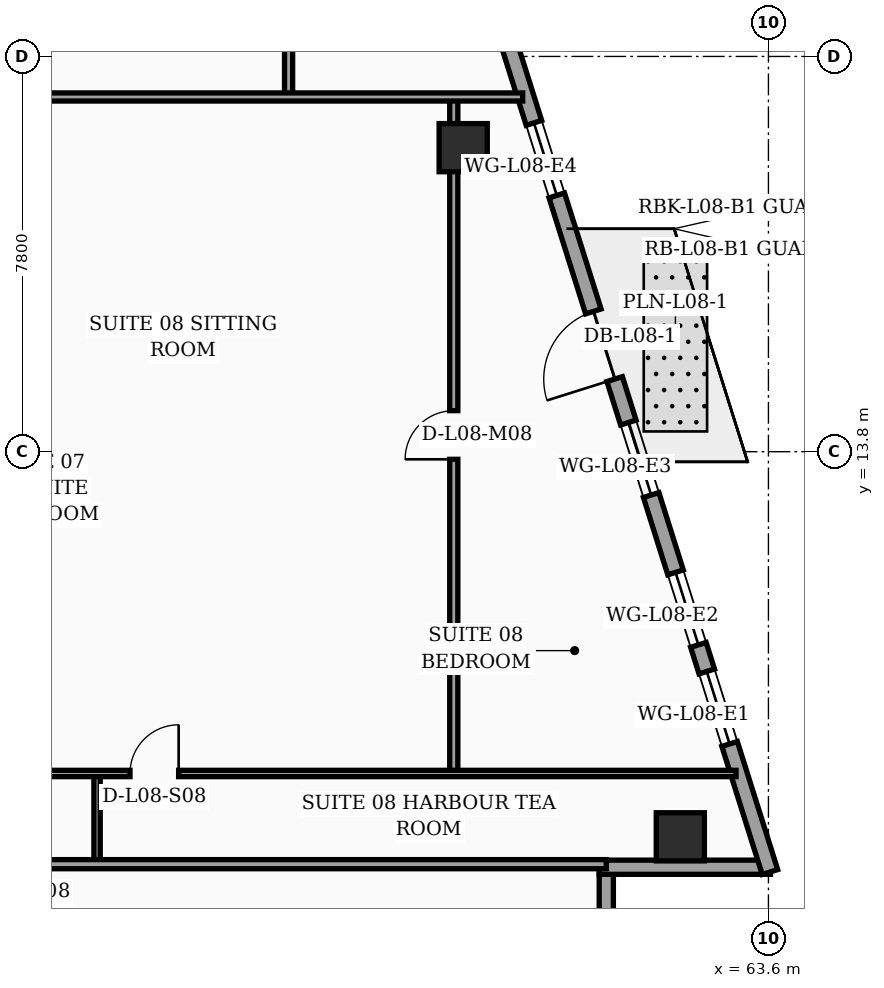
"""IFC4 building model, lengths in metres.
Left out: names, types, materials, properties, quantities, classifications, styles, units other than length and angle.
Written with IfcOpenShell. Run it as: python <this file> out.ifc"""

import sys

from ifc_helpers import new_model, si_unit, direction, frame, frame_2d, origin, origin_2d, place, context, subcontext, project, spatial, rectangle, hollow_rectangle, extrude, element, fill, save


model = new_model("IFC4")
c1 = context("Model", 3, precision=1e-05, world=origin(), true_north=direction((0.0, 1.0)))
c2 = subcontext(c1, "Body", "Model", "MODEL_VIEW")
j1 = project(units=[si_unit("LENGTHUNIT", "METRE"), si_unit("PLANEANGLEUNIT", "RADIAN")], contexts=[c1])
p1 = place(None, origin())
s1 = spatial("IfcSite", under=j1, at=p1, CompositionType="ELEMENT")
p2 = place(p1, origin())
s2 = spatial("IfcBuilding", under=s1, at=p2, CompositionType="ELEMENT")
p3 = place(p2, frame((0.0, 0.0, 38.4)))
s3 = spatial("IfcBuildingStorey", under=s2, at=p3, CompositionType="ELEMENT", Elevation=38.4)
for number, where, z_axis, x_axis in (
    (1, (61.861, 6.2, 0.0), (0.0, 0.0, 1.0), (1.0, 0.0, 0.0)),
    (2, (57.576, 19.8, 0.0), (0.0, 0.0, 1.0), (1.0, 0.0, 0.0)),
):
    element("IfcColumn", number, at=place(p3, frame(where, z_axis=z_axis, x_axis=x_axis)), inside=s3, PredefinedType="COLUMN", context=c2, shape_type="SweptSolid", body=[
        extrude(hollow_rectangle(XDim=0.95, YDim=0.95, WallThickness=0.04, at=origin_2d()), origin(), (0.0, 0.0, 1.0), 3.56),
    ])
p4 = place(p3, frame((60.4, 2.52, 0.0), z_axis=(0.0, 0.0, 1.0), x_axis=(0.0, 1.0, 0.0)))
e3 = element("IfcWall", 3, at=p4, inside=s3, PredefinedType="SOLIDWALL", context=c2, shape_type="SweptSolid", body=[
    extrude(rectangle(XDim=2.94, YDim=0.28, at=frame_2d((1.47, 0.0))), origin(), (0.0, 0.0, 1.0), 3.04),
])
p5 = place(p3, frame((60.26, 5.6, 0.0), z_axis=(0.0, 0.0, 1.0), x_axis=(1.0, 0.0, 0.0)))
e4 = element("IfcWall", 4, at=p5, inside=s3, PredefinedType="SOLIDWALL", context=c2, shape_type="SweptSolid", body=[
    extrude(rectangle(XDim=3.38, YDim=0.28, at=frame_2d((1.69, 0.0))), origin(), (0.0, 0.0, 1.0), 3.04),
])
p6 = place(p3, frame((63.63, 5.505, 0.0), z_axis=(0.0, 0.0, 1.0), x_axis=(-0.300501856448, 0.953781229775, 0.0)))
e5 = element("IfcWall", 5, at=p6, inside=s3, PredefinedType="SOLIDWALL", context=c2, shape_type="SweptSolid", body=[
    extrude(rectangle(XDim=30.814, YDim=0.32, at=frame_2d((15.407, 0.0))), origin(), (0.0, 0.0, 1.0), 3.56),
])
p7 = place(p6, frame((10.199, 0.0, 0.0)))
e6 = element("IfcOpeningElement", 6, at=p7, cuts=e5, PredefinedType="OPENING", context=c2, shape_type="SweptSolid", body=[
    extrude(rectangle(XDim=1.4, YDim=2.25, at=frame_2d((0.7, 1.125))), frame((0.0, 0.17, 0.0), z_axis=(0.0, -1.0, 0.0), x_axis=(1.0, 0.0, 0.0)), (0.0, 0.0, 1.0), 0.34),
])
p8 = place(p6, frame((2.65, 0.0, 0.75)))
e7 = element("IfcOpeningElement", 7, at=p8, cuts=e5, PredefinedType="OPENING", context=c2, shape_type="SweptSolid", body=[
    extrude(rectangle(XDim=1.5, YDim=1.6, at=frame_2d((0.75, 0.8))), frame((0.0, 0.17, 0.0), z_axis=(0.0, -1.0, 0.0), x_axis=(1.0, 0.0, 0.0)), (0.0, 0.0, 1.0), 0.34),
])
p9 = place(p6, frame((4.7, 0.0, 0.75)))
e8 = element("IfcOpeningElement", 8, at=p9, cuts=e5, PredefinedType="OPENING", context=c2, shape_type="SweptSolid", body=[
    extrude(rectangle(XDim=1.5, YDim=1.6, at=frame_2d((0.75, 0.8))), frame((0.0, 0.17, 0.0), z_axis=(0.0, -1.0, 0.0), x_axis=(1.0, 0.0, 0.0)), (0.0, 0.0, 1.0), 0.34),
])
p10 = place(p6, frame((7.8, 0.0, 0.75)))
e9 = element("IfcOpeningElement", 9, at=p10, cuts=e5, PredefinedType="OPENING", context=c2, shape_type="SweptSolid", body=[
    extrude(rectangle(XDim=1.5, YDim=1.6, at=frame_2d((0.75, 0.8))), frame((0.0, 0.17, 0.0), z_axis=(0.0, -1.0, 0.0), x_axis=(1.0, 0.0, 0.0)), (0.0, 0.0, 1.0), 0.34),
])
p11 = place(p6, frame((14.0, 0.0, 0.75)))
e10 = element("IfcOpeningElement", 10, at=p11, cuts=e5, PredefinedType="OPENING", context=c2, shape_type="SweptSolid", body=[
    extrude(rectangle(XDim=1.5, YDim=1.6, at=frame_2d((0.75, 0.8))), frame((0.0, 0.17, 0.0), z_axis=(0.0, -1.0, 0.0), x_axis=(1.0, 0.0, 0.0)), (0.0, 0.0, 1.0), 0.34),
])
p12 = place(p6, frame((17.1, 0.0, 0.75)))
e11 = element("IfcOpeningElement", 11, at=p12, cuts=e5, PredefinedType="OPENING", context=c2, shape_type="SweptSolid", body=[
    extrude(rectangle(XDim=1.5, YDim=1.6, at=frame_2d((0.75, 0.8))), frame((0.0, 0.17, 0.0), z_axis=(0.0, -1.0, 0.0), x_axis=(1.0, 0.0, 0.0)), (0.0, 0.0, 1.0), 0.34),
])
p13 = place(p6, frame((20.2, 0.0, 0.75)))
e12 = element("IfcOpeningElement", 12, at=p13, cuts=e5, PredefinedType="OPENING", context=c2, shape_type="SweptSolid", body=[
    extrude(rectangle(XDim=1.5, YDim=1.6, at=frame_2d((0.75, 0.8))), frame((0.0, 0.17, 0.0), z_axis=(0.0, -1.0, 0.0), x_axis=(1.0, 0.0, 0.0)), (0.0, 0.0, 1.0), 0.34),
])
p14 = place(p6, frame((26.4, 0.0, 0.75)))
e13 = element("IfcOpeningElement", 13, at=p14, cuts=e5, PredefinedType="OPENING", context=c2, shape_type="SweptSolid", body=[
    extrude(rectangle(XDim=1.5, YDim=1.6, at=frame_2d((0.75, 0.8))), frame((0.0, 0.17, 0.0), z_axis=(0.0, -1.0, 0.0), x_axis=(1.0, 0.0, 0.0)), (0.0, 0.0, 1.0), 0.34),
])
p15 = place(p3, frame((50.35, 5.66, 0.0), z_axis=(0.0, 0.0, 1.0), x_axis=(0.0, 1.0, 0.0)))
e14 = element("IfcWall", 14, at=p15, inside=s3, PredefinedType="PARTITIONING", context=c2, shape_type="SweptSolid", body=[
    extrude(rectangle(XDim=1.79, YDim=0.125, at=frame_2d((0.895, 0.0))), origin(), (0.0, 0.0, 1.0), 3.56),
])
p16 = place(p3, frame((57.39, 7.45, 0.0), z_axis=(0.0, 0.0, 1.0), x_axis=(0.0, 1.0, 0.0)))
e15 = element("IfcWall", 15, at=p16, inside=s3, PredefinedType="PARTITIONING", context=c2, shape_type="SweptSolid", body=[
    extrude(rectangle(XDim=13.35, YDim=0.16, at=frame_2d((6.675, 0.0))), origin(), (0.0, 0.0, 1.0), 2.84),
])
p17 = place(p16, frame((6.2, 0.0, 0.0)))
e16 = element("IfcOpeningElement", 16, at=p17, cuts=e15, PredefinedType="OPENING", context=c2, shape_type="SweptSolid", body=[
    extrude(rectangle(XDim=0.96, YDim=2.2, at=frame_2d((0.48, 1.1))), frame((0.0, 0.09, 0.0), z_axis=(0.0, -1.0, 0.0), x_axis=(1.0, 0.0, 0.0)), (0.0, 0.0, 1.0), 0.18),
])
p18 = place(p3, frame((47.4, 7.45, 0.0), z_axis=(0.0, 0.0, 1.0), x_axis=(1.0, 0.0, 0.0)))
e17 = element("IfcWall", 17, at=p18, inside=s3, PredefinedType="PARTITIONING", context=c2, shape_type="SweptSolid", body=[
    extrude(rectangle(XDim=15.56, YDim=0.125, at=frame_2d((7.78, 0.0))), origin(), (0.0, 0.0, 1.0), 2.84),
])
p19 = place(p18, frame((0.5, 0.0, 0.0)))
e18 = element("IfcOpeningElement", 18, at=p19, cuts=e17, PredefinedType="OPENING", context=c2, shape_type="SweptSolid", body=[
    extrude(rectangle(XDim=0.9, YDim=2.15, at=frame_2d((0.45, 1.075))), frame((0.0, 0.073, 0.0), z_axis=(0.0, -1.0, 0.0), x_axis=(1.0, 0.0, 0.0)), (0.0, 0.0, 1.0), 0.145),
])
p20 = place(p18, frame((3.6, 0.0, 0.0)))
e19 = element("IfcOpeningElement", 19, at=p20, cuts=e17, PredefinedType="OPENING", context=c2, shape_type="SweptSolid", body=[
    extrude(rectangle(XDim=0.96, YDim=2.2, at=frame_2d((0.48, 1.1))), frame((0.0, 0.073, 0.0), z_axis=(0.0, -1.0, 0.0), x_axis=(1.0, 0.0, 0.0)), (0.0, 0.0, 1.0), 0.145),
])
p21 = place(p3, frame((47.4, 5.66, 0.0), z_axis=(0.0, 0.0, 1.0), x_axis=(1.0, 0.0, 0.0)))
e20 = element("IfcWall", 20, at=p21, inside=s3, PredefinedType="PARTITIONING", context=c2, shape_type="SweptSolid", body=[
    extrude(rectangle(XDim=13.0, YDim=0.18, at=frame_2d((6.5, 0.0))), origin(), (0.0, 0.0, 1.0), 2.84),
])
p22 = place(p3, frame((54.13, 20.8, 0.0), z_axis=(0.0, 0.0, 1.0), x_axis=(0.0, 1.0, 0.0)))
e21 = element("IfcWall", 21, at=p22, inside=s3, PredefinedType="PARTITIONING", context=c2, shape_type="SweptSolid", body=[
    extrude(rectangle(XDim=7.35, YDim=0.16, at=frame_2d((3.675, 0.0))), origin(), (0.0, 0.0, 1.0), 3.09),
])
p23 = place(p22, frame((3.19, 0.0, 0.0)))
e22 = element("IfcOpeningElement", 22, at=p23, cuts=e21, PredefinedType="OPENING", context=c2, shape_type="SweptSolid", body=[
    extrude(rectangle(XDim=0.96, YDim=2.2, at=frame_2d((0.48, 1.1))), frame((0.0, 0.09, 0.0), z_axis=(0.0, -1.0, 0.0), x_axis=(1.0, 0.0, 0.0)), (0.0, 0.0, 1.0), 0.18),
])
p24 = place(p3, frame((47.4, 20.8, 0.0), z_axis=(0.0, 0.0, 1.0), x_axis=(1.0, 0.0, 0.0)))
e23 = element("IfcWall", 23, at=p24, inside=s3, PredefinedType="PARTITIONING", context=c2, shape_type="SweptSolid", body=[
    extrude(rectangle(XDim=11.35, YDim=0.16, at=frame_2d((5.675, 0.0))), origin(), (0.0, 0.0, 1.0), 3.04),
])
p25 = place(p7, origin())
e24 = element("IfcDoor", 24, at=p25, inside=s3, OperationType="SINGLE_SWING_LEFT", PredefinedType="DOOR", context=c2, shape_type="SweptSolid", body=[
    extrude(rectangle(XDim=1.4, YDim=2.25, at=frame_2d((0.7, 1.125))), frame((0.0, 0.025, 0.0), z_axis=(0.0, -1.0, 0.0), x_axis=(1.0, 0.0, 0.0)), (0.0, 0.0, 1.0), 0.05),
])
fill(e6, e24)
p26 = place(p8, origin())
e25 = element("IfcWindow", 25, at=p26, inside=s3, PartitioningType="SINGLE_PANEL", PredefinedType="WINDOW", context=c2, shape_type="SweptSolid", body=[
    extrude(rectangle(XDim=1.5, YDim=1.6, at=frame_2d((0.75, 0.8))), frame((0.0, 0.03, 0.0), z_axis=(0.0, -1.0, 0.0), x_axis=(1.0, 0.0, 0.0)), (0.0, 0.0, 1.0), 0.06),
])
fill(e7, e25)
p27 = place(p9, origin())
e26 = element("IfcWindow", 26, at=p27, inside=s3, PartitioningType="SINGLE_PANEL", PredefinedType="WINDOW", context=c2, shape_type="SweptSolid", body=[
    extrude(rectangle(XDim=1.5, YDim=1.6, at=frame_2d((0.75, 0.8))), frame((0.0, 0.03, 0.0), z_axis=(0.0, -1.0, 0.0), x_axis=(1.0, 0.0, 0.0)), (0.0, 0.0, 1.0), 0.06),
])
fill(e8, e26)
p28 = place(p10, origin())
e27 = element("IfcWindow", 27, at=p28, inside=s3, PartitioningType="SINGLE_PANEL", PredefinedType="WINDOW", context=c2, shape_type="SweptSolid", body=[
    extrude(rectangle(XDim=1.5, YDim=1.6, at=frame_2d((0.75, 0.8))), frame((0.0, 0.03, 0.0), z_axis=(0.0, -1.0, 0.0), x_axis=(1.0, 0.0, 0.0)), (0.0, 0.0, 1.0), 0.06),
])
fill(e9, e27)
p29 = place(p11, origin())
e28 = element("IfcWindow", 28, at=p29, inside=s3, PartitioningType="SINGLE_PANEL", PredefinedType="WINDOW", context=c2, shape_type="SweptSolid", body=[
    extrude(rectangle(XDim=1.5, YDim=1.6, at=frame_2d((0.75, 0.8))), frame((0.0, 0.03, 0.0), z_axis=(0.0, -1.0, 0.0), x_axis=(1.0, 0.0, 0.0)), (0.0, 0.0, 1.0), 0.06),
])
fill(e10, e28)
p30 = place(p17, origin())
e29 = element("IfcDoor", 29, at=p30, inside=s3, OperationType="SINGLE_SWING_LEFT", PredefinedType="DOOR", context=c2, shape_type="SweptSolid", body=[
    extrude(rectangle(XDim=0.96, YDim=2.2, at=frame_2d((0.48, 1.1))), frame((0.0, 0.025, 0.0), z_axis=(0.0, -1.0, 0.0), x_axis=(1.0, 0.0, 0.0)), (0.0, 0.0, 1.0), 0.05),
])
fill(e16, e29)
p31 = place(p20, origin())
e30 = element("IfcDoor", 30, at=p31, inside=s3, OperationType="SINGLE_SWING_RIGHT", PredefinedType="DOOR", context=c2, shape_type="SweptSolid", body=[
    extrude(rectangle(XDim=0.96, YDim=2.2, at=frame_2d((0.48, 1.1))), frame((0.0, 0.025, 0.0), z_axis=(0.0, -1.0, 0.0), x_axis=(1.0, 0.0, 0.0)), (0.0, 0.0, 1.0), 0.05),
])
fill(e19, e30)
save(model, sys.argv[1])
